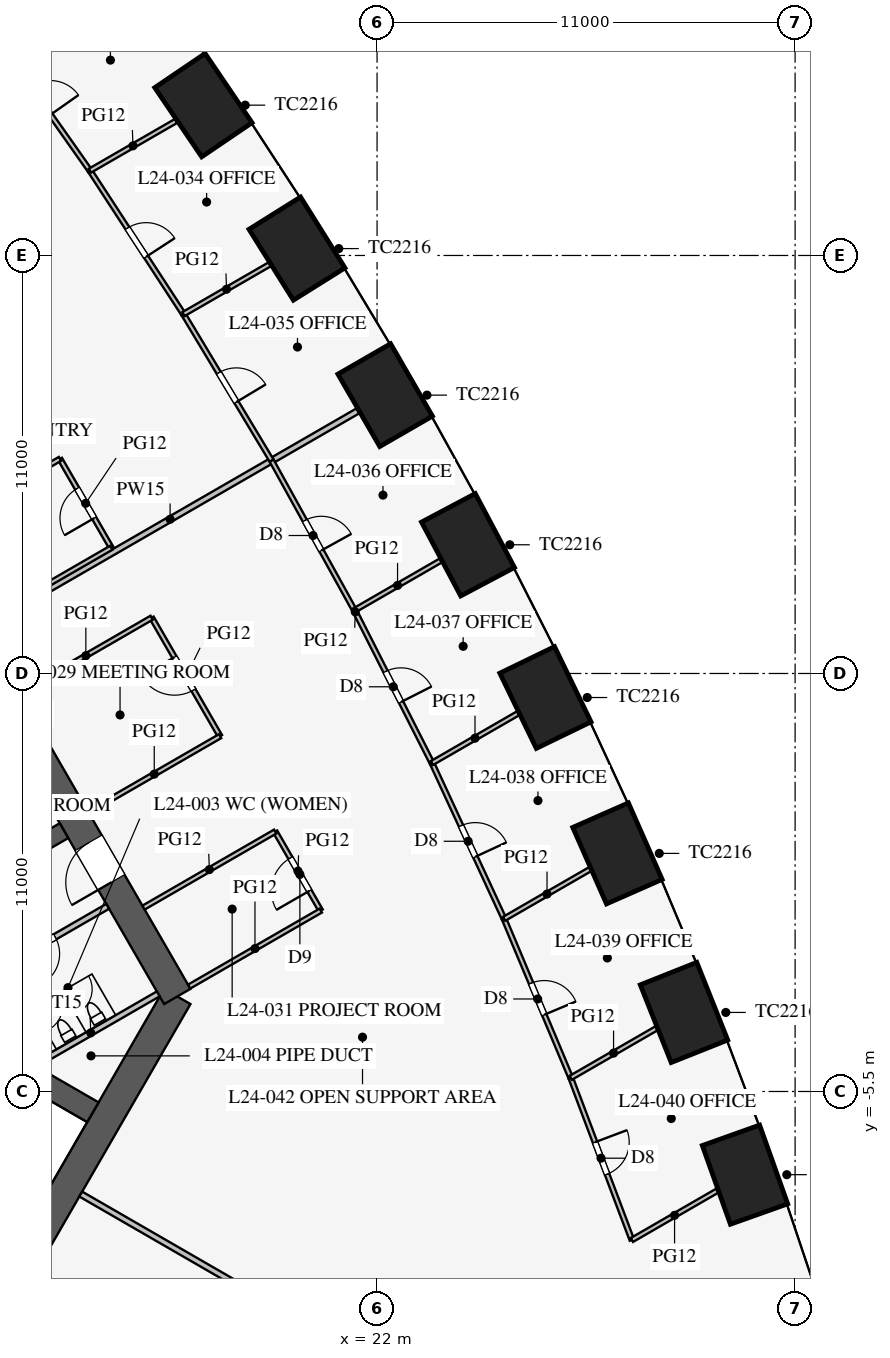
"""IFC4 building model, lengths in metres.
Left out: names, types, materials, properties, quantities, classifications, styles, units other than length and angle.
Written with IfcOpenShell. Run it as: python <this file> out.ifc"""

import sys

from ifc_helpers import new_model, si_unit, direction, frame, frame_2d, origin, origin_2d, place, context, subcontext, project, spatial, rectangle, extrude, element, fill, save


model = new_model("IFC4")
c1 = context("Model", 3, precision=1e-05, world=origin(), true_north=direction((0.0, 1.0)))
c2 = subcontext(c1, "Body", "Model", "MODEL_VIEW")
j1 = project(units=[si_unit("LENGTHUNIT", "METRE"), si_unit("PLANEANGLEUNIT", "RADIAN")], contexts=[c1])
p1 = place(None, origin())
s1 = spatial("IfcSite", under=j1, at=p1, CompositionType="ELEMENT")
p2 = place(p1, origin())
s2 = spatial("IfcBuilding", under=s1, at=p2, CompositionType="ELEMENT")
p3 = place(p2, frame((0.0, 0.0, 107.3)))
s3 = spatial("IfcBuildingStorey", under=s2, at=p3, CompositionType="ELEMENT", Elevation=107.3)
for number, where, z_axis, x_axis in (
    (1, (31.682, -7.689, 0.0), (0.0, 0.0, 1.0), (-0.336, 0.942, 0.0)),
    (2, (30.077, -3.42, 0.0), (0.0, 0.0, 1.0), (-0.37, 0.929, 0.0)),
    (3, (28.325, 0.765, 0.0), (0.0, 0.0, 1.0), (-0.403, 0.915, 0.0)),
    (4, (26.43, 4.867, 0.0), (0.0, 0.0, 1.0), (-0.436, 0.9, 0.0)),
    (5, (24.393, 8.887, 0.0), (0.0, 0.0, 1.0), (-0.468, 0.883, 0.0)),
    (6, (22.213, 12.825, 0.0), (0.0, 0.0, 1.0), (-0.5, 0.866, 0.0)),
    (7, (19.893, 16.681, 0.0), (0.0, 0.0, 1.0), (-0.531, 0.847, 0.0)),
    (8, (17.43, 20.456, 0.0), (0.0, 0.0, 1.0), (-0.561, 0.828, 0.0)),
):
    element("IfcColumn", number, at=place(p3, frame(where, z_axis=z_axis, x_axis=x_axis)), inside=s3, PredefinedType="COLUMN", context=c2, shape_type="SweptSolid", body=[
        extrude(rectangle(XDim=2.2, YDim=1.6, at=origin_2d()), origin(), (0.0, 0.0, 1.0), 4.2),
    ])
p4 = place(p3, frame((10.97, -13.0, 0.0), z_axis=(0.0, 0.0, 1.0), x_axis=(0.499995765644, 0.866027848477, 0.0)))
e9 = element("IfcWall", 9, at=p4, inside=s3, PredefinedType="SHEAR", context=c2, shape_type="SweptSolid", body=[
    extrude(rectangle(XDim=11.547, YDim=0.8, at=frame_2d((5.773, 0.0))), origin(), (0.0, 0.0, 1.0), 4.2),
])
p5 = place(p3, frame((16.743, -3.0, 0.0), z_axis=(0.0, 0.0, 1.0), x_axis=(-0.500002442456, 0.866023993627, 0.0)))
e10 = element("IfcWall", 10, at=p5, inside=s3, PredefinedType="SHEAR", context=c2, shape_type="SweptSolid", body=[
    extrude(rectangle(XDim=21.939, YDim=0.8, at=frame_2d((10.97, 0.0))), origin(), (0.0, 0.0, 1.0), 4.2),
])
p6 = place(p5, frame((17.27, 0.0, 0.0)))
e11 = element("IfcOpeningElement", 11, at=p6, cuts=e10, PredefinedType="OPENING", context=c2, shape_type="SweptSolid", body=[
    extrude(rectangle(XDim=1.2, YDim=2.1, at=frame_2d((0.6, 1.05))), frame((0.0, 0.41, 0.0), z_axis=(0.0, -1.0, 0.0), x_axis=(1.0, 0.0, 0.0)), (0.0, 0.0, 1.0), 0.82),
])
p7 = place(p5, frame((3.47, 0.0, 0.0)))
e12 = element("IfcOpeningElement", 12, at=p7, cuts=e10, PredefinedType="OPENING", context=c2, shape_type="SweptSolid", body=[
    extrude(rectangle(XDim=1.2, YDim=2.1, at=frame_2d((0.6, 1.05))), frame((0.0, 0.41, 0.0), z_axis=(0.0, -1.0, 0.0), x_axis=(1.0, 0.0, 0.0)), (0.0, 0.0, 1.0), 0.82),
])
p8 = place(p3, frame((11.532, 0.076, 0.0), z_axis=(0.0, 0.0, 1.0), x_axis=(0.866005588531, 0.500034319456, 0.0)))
e13 = element("IfcWall", 13, at=p8, inside=s3, PredefinedType="SHEAR", context=c2, shape_type="SweptSolid", body=[
    extrude(rectangle(XDim=2.575, YDim=0.45, at=frame_2d((1.288, 0.0))), origin(), (0.0, 0.0, 1.0), 4.2),
])
p9 = place(p3, frame((6.663, -1.509, 0.0), z_axis=(0.0, 0.0, 1.0), x_axis=(0.866019375473, -0.500010441196, 0.0)))
e14 = element("IfcWall", 14, at=p9, inside=s3, PredefinedType="SHEAR", context=c2, shape_type="SweptSolid", body=[
    extrude(rectangle(XDim=9.075, YDim=0.6, at=frame_2d((4.538, 0.0))), origin(), (0.0, 0.0, 1.0), 4.2),
])
p10 = place(p3, frame((10.495, -3.178, 0.0), z_axis=(0.0, 0.0, 1.0), x_axis=(0.86602216432, 0.500005610874, 0.0)))
e15 = element("IfcWall", 15, at=p10, inside=s3, PredefinedType="PARTITIONING", context=c2, shape_type="SweptSolid", body=[
    extrude(rectangle(XDim=5.1, YDim=0.15, at=frame_2d((2.55, 0.0))), origin(), (0.0, 0.0, 1.0), 4.0),
])
p11 = place(p10, frame((2.6, 0.0, 0.0)))
e16 = element("IfcOpeningElement", 16, at=p11, cuts=e15, PredefinedType="OPENING", context=c2, shape_type="SweptSolid", body=[
    extrude(rectangle(XDim=0.9, YDim=2.1, at=frame_2d((0.45, 1.05))), frame((0.0, 0.085, 0.0), z_axis=(0.0, -1.0, 0.0), x_axis=(1.0, 0.0, 0.0)), (0.0, 0.0, 1.0), 0.17),
])
p12 = place(p3, frame((12.691, -4.982, 0.0), z_axis=(0.0, 0.0, 1.0), x_axis=(0.8660249478, 0.500000789788, 0.0)))
e17 = element("IfcWall", 17, at=p12, inside=s3, PredefinedType="PARTITIONING", context=c2, shape_type="SweptSolid", body=[
    extrude(rectangle(XDim=4.1, YDim=0.15, at=frame_2d((2.05, 0.0))), origin(), (0.0, 0.0, 1.0), 4.0),
])
p13 = place(p3, frame((14.203, -8.2, 0.0), z_axis=(0.0, 0.0, 1.0), x_axis=(0.866024668836, -0.500001272966, 0.0)))
e18 = element("IfcWall", 18, at=p13, inside=s3, PredefinedType="PARTITIONING", context=c2, shape_type="SweptSolid", body=[
    extrude(rectangle(XDim=16.65, YDim=0.15, at=frame_2d((8.325, 0.0))), origin(), (0.0, 0.0, 1.0), 2.3),
])
p14 = place(p3, frame((11.613, 6.705, 0.0), z_axis=(0.0, 0.0, 1.0), x_axis=(0.866026306654, 0.499998436182, 0.0)))
e19 = element("IfcWall", 19, at=p14, inside=s3, PredefinedType="PARTITIONING", context=c2, shape_type="SweptSolid", body=[
    extrude(rectangle(XDim=11.41, YDim=0.15, at=frame_2d((5.705, 0.0))), origin(), (0.0, 0.0, 1.0), 2.8),
])
p15 = place(p3, frame((15.006, 8.808, 0.0), z_axis=(0.0, 0.0, 1.0), x_axis=(-0.500048589285, 0.86599734893, 0.0)))
e20 = element("IfcWall", 20, at=p15, inside=s3, PredefinedType="PARTITIONING", context=c2, shape_type="SweptSolid", body=[
    extrude(rectangle(XDim=2.7, YDim=0.12, at=frame_2d((1.35, 0.0))), origin(), (0.0, 0.0, 1.0), 2.9),
])
p16 = place(p15, frame((0.9, 0.0, 0.15)))
e21 = element("IfcOpeningElement", 21, at=p16, cuts=e20, PredefinedType="OPENING", context=c2, shape_type="SweptSolid", body=[
    extrude(rectangle(XDim=0.9, YDim=2.1, at=frame_2d((0.45, 1.05))), frame((0.0, 0.07, 0.0), z_axis=(0.0, -1.0, 0.0), x_axis=(1.0, 0.0, 0.0)), (0.0, 0.0, 1.0), 0.14),
])
p17 = place(p3, frame((20.519, -0.74, 0.0), z_axis=(0.0, 0.0, 1.0), x_axis=(-0.499957262057, 0.866050077142, 0.0)))
e22 = element("IfcWall", 22, at=p17, inside=s3, PredefinedType="PARTITIONING", context=c2, shape_type="SweptSolid", body=[
    extrude(rectangle(XDim=2.4, YDim=0.12, at=frame_2d((1.2, 0.0))), origin(), (0.0, 0.0, 1.0), 2.9),
])
p18 = place(p17, frame((0.6, 0.0, 0.15)))
e23 = element("IfcOpeningElement", 23, at=p18, cuts=e22, PredefinedType="OPENING", context=c2, shape_type="SweptSolid", body=[
    extrude(rectangle(XDim=1.0, YDim=2.1, at=frame_2d((0.5, 1.05))), frame((0.0, 0.07, 0.0), z_axis=(0.0, -1.0, 0.0), x_axis=(1.0, 0.0, 0.0)), (0.0, 0.0, 1.0), 0.14),
])
p19 = place(p3, frame((17.869, 3.85, 0.0), z_axis=(0.0, 0.0, 1.0), x_axis=(-0.500012057535, 0.866018442252, 0.0)))
e24 = element("IfcWall", 24, at=p19, inside=s3, PredefinedType="PARTITIONING", context=c2, shape_type="SweptSolid", body=[
    extrude(rectangle(XDim=3.6, YDim=0.12, at=frame_2d((1.8, 0.0))), origin(), (0.0, 0.0, 1.0), 2.9),
])
p20 = place(p19, frame((1.4, 0.0, 0.15)))
e25 = element("IfcOpeningElement", 25, at=p20, cuts=e24, PredefinedType="OPENING", context=c2, shape_type="SweptSolid", body=[
    extrude(rectangle(XDim=1.0, YDim=2.1, at=frame_2d((0.5, 1.05))), frame((0.0, 0.07, 0.0), z_axis=(0.0, -1.0, 0.0), x_axis=(1.0, 0.0, 0.0)), (0.0, 0.0, 1.0), 0.14),
])
p21 = place(p3, frame((11.542, 6.808, 0.0), z_axis=(0.0, 0.0, 1.0), x_axis=(0.866026010844, 0.49999894854, 0.0)))
e26 = element("IfcWall", 26, at=p21, inside=s3, PredefinedType="PARTITIONING", context=c2, shape_type="SweptSolid", body=[
    extrude(rectangle(XDim=4.0, YDim=0.12, at=frame_2d((2.0, 0.0))), origin(), (0.0, 0.0, 1.0), 2.8),
])
for number, where, z_axis, x_axis in (
    (27, (10.192, 9.146, 0.0), (0.0, 0.0, 1.0), (0.866, 0.5, 0.0)),
    (28, (17.055, -2.74, 0.0), (0.0, 0.0, 1.0), (0.866, 0.5, 0.0)),
    (29, (12.605, 4.968, 0.0), (0.0, 0.0, 1.0), (0.866, 0.5, 0.0)),
    (30, (14.405, 1.85, 0.0), (0.0, 0.0, 1.0), (0.866, 0.5, 0.0)),
    (31, (15.855, -0.661, 0.0), (0.0, 0.0, 1.0), (0.866, 0.5, 0.0)),
):
    element("IfcWall", number, at=place(p3, frame(where, z_axis=z_axis, x_axis=x_axis)), inside=s3, PredefinedType="PARTITIONING", context=c2, shape_type="SweptSolid", body=[
        extrude(rectangle(XDim=4.0, YDim=0.12, at=frame_2d((2.0, 0.0))), origin(), (0.0, 0.0, 1.0), 2.9),
    ])
p22 = place(p3, frame((19.226, 11.1, 0.0), z_axis=(0.0, 0.0, 1.0), x_axis=(-0.515548366618, 0.856860479703, 0.0)))
e32 = element("IfcWall", 32, at=p22, inside=s3, PredefinedType="PARTITIONING", context=c2, shape_type="SweptSolid", body=[
    extrude(rectangle(XDim=4.501, YDim=0.12, at=frame_2d((2.25, 0.0))), origin(), (0.0, 0.0, 1.0), 2.9),
])
p23 = place(p22, frame((1.8, 0.0, 0.15)))
e33 = element("IfcOpeningElement", 33, at=p23, cuts=e32, PredefinedType="OPENING", context=c2, shape_type="SweptSolid", body=[
    extrude(rectangle(XDim=0.9, YDim=2.1, at=frame_2d((0.45, 1.05))), frame((0.0, 0.07, 0.0), z_axis=(0.0, -1.0, 0.0), x_axis=(1.0, 0.0, 0.0)), (0.0, 0.0, 1.0), 0.14),
])
p24 = place(p3, frame((16.905, 14.956, 0.0), z_axis=(0.0, 0.0, 1.0), x_axis=(-0.546069464151, 0.837739900161, 0.0)))
e34 = element("IfcWall", 34, at=p24, inside=s3, PredefinedType="PARTITIONING", context=c2, shape_type="SweptSolid", body=[
    extrude(rectangle(XDim=4.507, YDim=0.12, at=frame_2d((2.253, 0.0))), origin(), (0.0, 0.0, 1.0), 2.9),
])
p25 = place(p24, frame((1.8, 0.0, 0.15)))
e35 = element("IfcOpeningElement", 35, at=p25, cuts=e34, PredefinedType="OPENING", context=c2, shape_type="SweptSolid", body=[
    extrude(rectangle(XDim=0.9, YDim=2.1, at=frame_2d((0.45, 1.05))), frame((0.0, 0.07, 0.0), z_axis=(0.0, -1.0, 0.0), x_axis=(1.0, 0.0, 0.0)), (0.0, 0.0, 1.0), 0.14),
])
p26 = place(p3, frame((14.444, 18.732, 0.0), z_axis=(0.0, 0.0, 1.0), x_axis=(-0.576023283708, 0.817433285734, 0.0)))
e36 = element("IfcWall", 36, at=p26, inside=s3, PredefinedType="PARTITIONING", context=c2, shape_type="SweptSolid", body=[
    extrude(rectangle(XDim=4.519, YDim=0.12, at=frame_2d((2.259, 0.0))), origin(), (0.0, 0.0, 1.0), 2.9),
])
p27 = place(p26, frame((1.8, 0.0, 0.15)))
e37 = element("IfcOpeningElement", 37, at=p27, cuts=e36, PredefinedType="OPENING", context=c2, shape_type="SweptSolid", body=[
    extrude(rectangle(XDim=0.9, YDim=2.1, at=frame_2d((0.45, 1.05))), frame((0.0, 0.07, 0.0), z_axis=(0.0, -1.0, 0.0), x_axis=(1.0, 0.0, 0.0)), (0.0, 0.0, 1.0), 0.14),
])
p28 = place(p3, frame((25.342, -0.958, 0.0), z_axis=(0.0, 0.0, 1.0), x_axis=(-0.419883773418, 0.907577884713, 0.0)))
e38 = element("IfcWall", 38, at=p28, inside=s3, PredefinedType="PARTITIONING", context=c2, shape_type="SweptSolid", body=[
    extrude(rectangle(XDim=4.519, YDim=0.12, at=frame_2d((2.259, 0.0))), origin(), (0.0, 0.0, 1.0), 2.9),
])
p29 = place(p28, frame((1.8, 0.0, 0.15)))
e39 = element("IfcOpeningElement", 39, at=p29, cuts=e38, PredefinedType="OPENING", context=c2, shape_type="SweptSolid", body=[
    extrude(rectangle(XDim=0.9, YDim=2.1, at=frame_2d((0.45, 1.05))), frame((0.0, 0.07, 0.0), z_axis=(0.0, -1.0, 0.0), x_axis=(1.0, 0.0, 0.0)), (0.0, 0.0, 1.0), 0.14),
])
p30 = place(p3, frame((27.096, -5.141, 0.0), z_axis=(0.0, 0.0, 1.0), x_axis=(-0.386807881778, 0.922160323693, 0.0)))
e40 = element("IfcWall", 40, at=p30, inside=s3, PredefinedType="PARTITIONING", context=c2, shape_type="SweptSolid", body=[
    extrude(rectangle(XDim=4.536, YDim=0.12, at=frame_2d((2.268, 0.0))), origin(), (0.0, 0.0, 1.0), 2.9),
])
p31 = place(p30, frame((1.8, 0.0, 0.15)))
e41 = element("IfcOpeningElement", 41, at=p31, cuts=e40, PredefinedType="OPENING", context=c2, shape_type="SweptSolid", body=[
    extrude(rectangle(XDim=0.9, YDim=2.1, at=frame_2d((0.45, 1.05))), frame((0.0, 0.07, 0.0), z_axis=(0.0, -1.0, 0.0), x_axis=(1.0, 0.0, 0.0)), (0.0, 0.0, 1.0), 0.14),
])
p32 = place(p3, frame((28.706, -9.408, 0.0), z_axis=(0.0, 0.0, 1.0), x_axis=(-0.352894560512, 0.93566309597, 0.0)))
e42 = element("IfcWall", 42, at=p32, inside=s3, PredefinedType="PARTITIONING", context=c2, shape_type="SweptSolid", body=[
    extrude(rectangle(XDim=4.561, YDim=0.12, at=frame_2d((2.28, 0.0))), origin(), (0.0, 0.0, 1.0), 2.9),
])
p33 = place(p32, frame((1.85, 0.0, 0.15)))
e43 = element("IfcOpeningElement", 43, at=p33, cuts=e42, PredefinedType="OPENING", context=c2, shape_type="SweptSolid", body=[
    extrude(rectangle(XDim=0.9, YDim=2.1, at=frame_2d((0.45, 1.05))), frame((0.0, 0.07, 0.0), z_axis=(0.0, -1.0, 0.0), x_axis=(1.0, 0.0, 0.0)), (0.0, 0.0, 1.0), 0.14),
])
p34 = place(p3, frame((21.405, 7.162, 0.0), z_axis=(0.0, 0.0, 1.0), x_axis=(-0.484292898211, 0.874905931368, 0.0)))
e44 = element("IfcWall", 44, at=p34, inside=s3, PredefinedType="PARTITIONING", context=c2, shape_type="SweptSolid", body=[
    extrude(rectangle(XDim=4.501, YDim=0.12, at=frame_2d((2.25, 0.0))), origin(), (0.0, 0.0, 1.0), 2.9),
])
p35 = place(p34, frame((1.8, 0.0, 0.15)))
e45 = element("IfcOpeningElement", 45, at=p35, cuts=e44, PredefinedType="OPENING", context=c2, shape_type="SweptSolid", body=[
    extrude(rectangle(XDim=0.9, YDim=2.1, at=frame_2d((0.45, 1.05))), frame((0.0, 0.07, 0.0), z_axis=(0.0, -1.0, 0.0), x_axis=(1.0, 0.0, 0.0)), (0.0, 0.0, 1.0), 0.14),
])
p36 = place(p3, frame((23.444, 3.143, 0.0), z_axis=(0.0, 0.0, 1.0), x_axis=(-0.452471679136, 0.891778772779, 0.0)))
e46 = element("IfcWall", 46, at=p36, inside=s3, PredefinedType="PARTITIONING", context=c2, shape_type="SweptSolid", body=[
    extrude(rectangle(XDim=4.507, YDim=0.12, at=frame_2d((2.253, 0.0))), origin(), (0.0, 0.0, 1.0), 2.9),
])
p37 = place(p36, frame((1.8, 0.0, 0.15)))
e47 = element("IfcOpeningElement", 47, at=p37, cuts=e46, PredefinedType="OPENING", context=c2, shape_type="SweptSolid", body=[
    extrude(rectangle(XDim=0.9, YDim=2.1, at=frame_2d((0.45, 1.05))), frame((0.0, 0.07, 0.0), z_axis=(0.0, -1.0, 0.0), x_axis=(1.0, 0.0, 0.0)), (0.0, 0.0, 1.0), 0.14),
])
p38 = place(p3, frame((16.905, 14.956, 0.0), z_axis=(0.0, 0.0, 1.0), x_axis=(0.866008611403, 0.50002908413, 0.0)))
e48 = element("IfcWall", 48, at=p38, inside=s3, PredefinedType="PARTITIONING", context=c2, shape_type="SweptSolid", body=[
    extrude(rectangle(XDim=2.619, YDim=0.12, at=frame_2d((1.31, 0.0))), origin(), (0.0, 0.0, 1.0), 2.8),
])
p39 = place(p3, frame((14.444, 18.732, 0.0), z_axis=(0.0, 0.0, 1.0), x_axis=(0.866011491631, 0.500024095782, 0.0)))
e49 = element("IfcWall", 49, at=p39, inside=s3, PredefinedType="PARTITIONING", context=c2, shape_type="SweptSolid", body=[
    extrude(rectangle(XDim=2.615, YDim=0.12, at=frame_2d((1.308, 0.0))), origin(), (0.0, 0.0, 1.0), 2.9),
])
p40 = place(p3, frame((25.342, -0.958, 0.0), z_axis=(0.0, 0.0, 1.0), x_axis=(0.866036074319, 0.499981517636, 0.0)))
e50 = element("IfcWall", 50, at=p40, inside=s3, PredefinedType="PARTITIONING", context=c2, shape_type="SweptSolid", body=[
    extrude(rectangle(XDim=2.61, YDim=0.12, at=frame_2d((1.305, 0.0))), origin(), (0.0, 0.0, 1.0), 2.6),
])
p41 = place(p3, frame((27.096, -5.141, 0.0), z_axis=(0.0, 0.0, 1.0), x_axis=(0.866012205188, 0.500022859943, 0.0)))
e51 = element("IfcWall", 51, at=p41, inside=s3, PredefinedType="PARTITIONING", context=c2, shape_type="SweptSolid", body=[
    extrude(rectangle(XDim=2.603, YDim=0.12, at=frame_2d((1.302, 0.0))), origin(), (0.0, 0.0, 1.0), 2.8),
])
p42 = place(p3, frame((28.706, -9.408, 0.0), z_axis=(0.0, 0.0, 1.0), x_axis=(0.866003704883, 0.500037581717, 0.0)))
e52 = element("IfcWall", 52, at=p42, inside=s3, PredefinedType="PARTITIONING", context=c2, shape_type="SweptSolid", body=[
    extrude(rectangle(XDim=2.593, YDim=0.12, at=frame_2d((1.296, 0.0))), origin(), (0.0, 0.0, 1.0), 2.9),
])
p43 = place(p3, frame((21.405, 7.162, 0.0), z_axis=(0.0, 0.0, 1.0), x_axis=(0.866008611403, 0.50002908413, 0.0)))
e53 = element("IfcWall", 53, at=p43, inside=s3, PredefinedType="PARTITIONING", context=c2, shape_type="SweptSolid", body=[
    extrude(rectangle(XDim=2.619, YDim=0.12, at=frame_2d((1.31, 0.0))), origin(), (0.0, 0.0, 1.0), 2.8),
])
p44 = place(p3, frame((23.444, 3.143, 0.0), z_axis=(0.0, 0.0, 1.0), x_axis=(0.866011491631, 0.500024095782, 0.0)))
e54 = element("IfcWall", 54, at=p44, inside=s3, PredefinedType="PARTITIONING", context=c2, shape_type="SweptSolid", body=[
    extrude(rectangle(XDim=2.615, YDim=0.12, at=frame_2d((1.308, 0.0))), origin(), (0.0, 0.0, 1.0), 2.9),
])
p45 = place(p11, frame((0.9, 0.0, 0.0), z_axis=(0.0, 0.0, 1.0), x_axis=(-1.0, 0.0, 0.0)))
e55 = element("IfcDoor", 55, at=p45, inside=s3, OperationType="SINGLE_SWING_RIGHT", PredefinedType="DOOR", context=c2, shape_type="SweptSolid", body=[
    extrude(rectangle(XDim=0.9, YDim=2.1, at=frame_2d((0.45, 1.05))), frame((0.0, 0.025, 0.0), z_axis=(0.0, -1.0, 0.0), x_axis=(1.0, 0.0, 0.0)), (0.0, 0.0, 1.0), 0.05),
])
fill(e16, e55)
p46 = place(p7, origin())
e56 = element("IfcDoor", 56, at=p46, inside=s3, OperationType="SINGLE_SWING_LEFT", PredefinedType="DOOR", context=c2, shape_type="SweptSolid", body=[
    extrude(rectangle(XDim=1.2, YDim=2.1, at=frame_2d((0.6, 1.05))), frame((0.0, 0.025, 0.0), z_axis=(0.0, -1.0, 0.0), x_axis=(1.0, 0.0, 0.0)), (0.0, 0.0, 1.0), 0.05),
])
fill(e12, e56)
p47 = place(p20, origin())
e57 = element("IfcDoor", 57, at=p47, inside=s3, OperationType="SINGLE_SWING_RIGHT", PredefinedType="DOOR", context=c2, shape_type="SweptSolid", body=[
    extrude(rectangle(XDim=1.0, YDim=2.1, at=frame_2d((0.5, 1.05))), frame((0.0, 0.025, 0.0), z_axis=(0.0, -1.0, 0.0), x_axis=(1.0, 0.0, 0.0)), (0.0, 0.0, 1.0), 0.05),
])
fill(e25, e57)
p48 = place(p16, origin())
e58 = element("IfcDoor", 58, at=p48, inside=s3, OperationType="SINGLE_SWING_LEFT", PredefinedType="DOOR", context=c2, shape_type="SweptSolid", body=[
    extrude(rectangle(XDim=0.9, YDim=2.1, at=frame_2d((0.45, 1.05))), frame((0.0, 0.025, 0.0), z_axis=(0.0, -1.0, 0.0), x_axis=(1.0, 0.0, 0.0)), (0.0, 0.0, 1.0), 0.05),
])
fill(e21, e58)
p49 = place(p18, origin())
e59 = element("IfcDoor", 59, at=p49, inside=s3, OperationType="SINGLE_SWING_LEFT", PredefinedType="DOOR", context=c2, shape_type="SweptSolid", body=[
    extrude(rectangle(XDim=1.0, YDim=2.1, at=frame_2d((0.5, 1.05))), frame((0.0, 0.025, 0.0), z_axis=(0.0, -1.0, 0.0), x_axis=(1.0, 0.0, 0.0)), (0.0, 0.0, 1.0), 0.05),
])
fill(e23, e59)
p50 = place(p25, frame((0.9, 0.0, 0.0), z_axis=(0.0, 0.0, 1.0), x_axis=(-1.0, 0.0, 0.0)))
e60 = element("IfcDoor", 60, at=p50, inside=s3, OperationType="SINGLE_SWING_RIGHT", PredefinedType="DOOR", context=c2, shape_type="SweptSolid", body=[
    extrude(rectangle(XDim=0.9, YDim=2.1, at=frame_2d((0.45, 1.05))), frame((0.0, 0.025, 0.0), z_axis=(0.0, -1.0, 0.0), x_axis=(1.0, 0.0, 0.0)), (0.0, 0.0, 1.0), 0.05),
])
fill(e35, e60)
p51 = place(p23, frame((0.9, 0.0, 0.0), z_axis=(0.0, 0.0, 1.0), x_axis=(-1.0, 0.0, 0.0)))
e61 = element("IfcDoor", 61, at=p51, inside=s3, OperationType="SINGLE_SWING_RIGHT", PredefinedType="DOOR", context=c2, shape_type="SweptSolid", body=[
    extrude(rectangle(XDim=0.9, YDim=2.1, at=frame_2d((0.45, 1.05))), frame((0.0, 0.025, 0.0), z_axis=(0.0, -1.0, 0.0), x_axis=(1.0, 0.0, 0.0)), (0.0, 0.0, 1.0), 0.05),
])
fill(e33, e61)
p52 = place(p35, frame((0.9, 0.0, 0.0), z_axis=(0.0, 0.0, 1.0), x_axis=(-1.0, 0.0, 0.0)))
e62 = element("IfcDoor", 62, at=p52, inside=s3, OperationType="SINGLE_SWING_RIGHT", PredefinedType="DOOR", context=c2, shape_type="SweptSolid", body=[
    extrude(rectangle(XDim=0.9, YDim=2.1, at=frame_2d((0.45, 1.05))), frame((0.0, 0.025, 0.0), z_axis=(0.0, -1.0, 0.0), x_axis=(1.0, 0.0, 0.0)), (0.0, 0.0, 1.0), 0.05),
])
fill(e45, e62)
p53 = place(p37, frame((0.9, 0.0, 0.0), z_axis=(0.0, 0.0, 1.0), x_axis=(-1.0, 0.0, 0.0)))
e63 = element("IfcDoor", 63, at=p53, inside=s3, OperationType="SINGLE_SWING_RIGHT", PredefinedType="DOOR", context=c2, shape_type="SweptSolid", body=[
    extrude(rectangle(XDim=0.9, YDim=2.1, at=frame_2d((0.45, 1.05))), frame((0.0, 0.025, 0.0), z_axis=(0.0, -1.0, 0.0), x_axis=(1.0, 0.0, 0.0)), (0.0, 0.0, 1.0), 0.05),
])
fill(e47, e63)
p54 = place(p29, frame((0.9, 0.0, 0.0), z_axis=(0.0, 0.0, 1.0), x_axis=(-1.0, 0.0, 0.0)))
e64 = element("IfcDoor", 64, at=p54, inside=s3, OperationType="SINGLE_SWING_RIGHT", PredefinedType="DOOR", context=c2, shape_type="SweptSolid", body=[
    extrude(rectangle(XDim=0.9, YDim=2.1, at=frame_2d((0.45, 1.05))), frame((0.0, 0.025, 0.0), z_axis=(0.0, -1.0, 0.0), x_axis=(1.0, 0.0, 0.0)), (0.0, 0.0, 1.0), 0.05),
])
fill(e39, e64)
p55 = place(p31, frame((0.9, 0.0, 0.0), z_axis=(0.0, 0.0, 1.0), x_axis=(-1.0, 0.0, 0.0)))
e65 = element("IfcDoor", 65, at=p55, inside=s3, OperationType="SINGLE_SWING_RIGHT", PredefinedType="DOOR", context=c2, shape_type="SweptSolid", body=[
    extrude(rectangle(XDim=0.9, YDim=2.1, at=frame_2d((0.45, 1.05))), frame((0.0, 0.025, 0.0), z_axis=(0.0, -1.0, 0.0), x_axis=(1.0, 0.0, 0.0)), (0.0, 0.0, 1.0), 0.05),
])
fill(e41, e65)
p56 = place(p33, frame((0.9, 0.0, 0.0), z_axis=(0.0, 0.0, 1.0), x_axis=(-1.0, 0.0, 0.0)))
e66 = element("IfcDoor", 66, at=p56, inside=s3, OperationType="SINGLE_SWING_LEFT", PredefinedType="DOOR", context=c2, shape_type="SweptSolid", body=[
    extrude(rectangle(XDim=0.9, YDim=2.1, at=frame_2d((0.45, 1.05))), frame((0.0, 0.025, 0.0), z_axis=(0.0, -1.0, 0.0), x_axis=(1.0, 0.0, 0.0)), (0.0, 0.0, 1.0), 0.05),
])
fill(e43, e66)
save(model, sys.argv[1])
